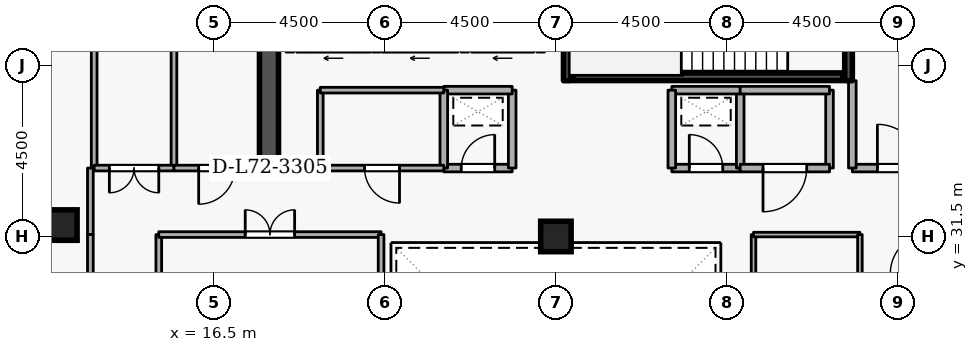
"""IFC4 building model, lengths in metres.
Left out: names, types, materials, properties, quantities, classifications, styles, units other than length and angle.
Written with IfcOpenShell. Run it as: python <this file> out.ifc"""

import sys

from ifc_helpers import new_model, si_unit, direction, frame, frame_2d, origin, origin_2d, place, context, subcontext, project, spatial, rectangle, extrude, element, fill, save


model = new_model("IFC4")
c1 = context("Model", 3, precision=1e-05, world=origin(), true_north=direction((0.0, 1.0)))
c2 = subcontext(c1, "Body", "Model", "MODEL_VIEW")
j1 = project(units=[si_unit("LENGTHUNIT", "METRE"), si_unit("PLANEANGLEUNIT", "RADIAN")], contexts=[c1])
p1 = place(None, origin())
s1 = spatial("IfcSite", under=j1, at=p1, CompositionType="ELEMENT")
p2 = place(p1, origin())
s2 = spatial("IfcBuilding", under=s1, at=p2, CompositionType="ELEMENT")
p3 = place(p2, frame((0.0, 0.0, 269.1)))
s3 = spatial("IfcBuildingStorey", under=s2, at=p3, CompositionType="ELEMENT", Elevation=269.1)
p4 = place(p3, frame((17.95, 33.1, 0.0), z_axis=(0.0, 0.0, 1.0), x_axis=(0.0, 1.0, 0.0)))
e1 = element("IfcWall", 1, at=p4, inside=s3, PredefinedType="SHEAR", context=c2, shape_type="SweptSolid", body=[
    extrude(rectangle(XDim=5.8, YDim=0.5, at=frame_2d((2.9, 0.0))), origin(), (0.0, 0.0, 1.0), 3.6),
])
for number, where, z_axis, x_axis in (
    (2, (12.5, 31.8, 0.0), (0.0, 0.0, 1.0), (1.0, 0.0, 0.0)),
    (3, (25.5, 31.5, 0.0), (0.0, 0.0, 1.0), (1.0, 0.0, 0.0)),
):
    element("IfcColumn", number, at=place(p3, frame(where, z_axis=z_axis, x_axis=x_axis)), inside=s3, PredefinedType="COLUMN", context=c2, shape_type="SweptSolid", body=[
        extrude(rectangle(XDim=0.8, YDim=0.8, at=origin_2d()), origin(), (0.0, 0.0, 1.0), 3.6),
    ])
p5 = place(p3, frame((24.92, 36.45, 0.0), z_axis=(0.0, 0.0, 1.0), x_axis=(-1.0, 0.0, 0.0)))
e4 = element("IfcWall", 4, at=p5, inside=s3, PredefinedType="STANDARD", context=c2, shape_type="SweptSolid", body=[
    extrude(rectangle(XDim=1.64, YDim=0.2, at=frame_2d((0.82, 0.0))), origin(), (0.0, 0.0, 1.0), 3.34),
])
p6 = place(p5, frame((0.31, 0.0, 0.0)))
e5 = element("IfcOpeningElement", 5, at=p6, cuts=e4, PredefinedType="OPENING", context=c2, shape_type="SweptSolid", body=[
    extrude(rectangle(XDim=1.02, YDim=2.06, at=frame_2d((0.51, 1.03))), frame((0.0, 0.11, 0.0), z_axis=(0.0, -1.0, 0.0), x_axis=(1.0, 0.0, 0.0)), (0.0, 0.0, 1.0), 0.22),
])
p7 = place(p3, frame((22.92, 36.45, 0.0), z_axis=(0.0, 0.0, 1.0), x_axis=(-1.0, 0.0, 0.0)))
e6 = element("IfcWall", 6, at=p7, inside=s3, PredefinedType="STANDARD", context=c2, shape_type="SweptSolid", body=[
    extrude(rectangle(XDim=1.99, YDim=0.2, at=frame_2d((0.995, 0.0))), origin(), (0.0, 0.0, 1.0), 3.34),
])
p8 = place(p7, frame((0.485, 0.0, 0.0)))
e7 = element("IfcOpeningElement", 7, at=p8, cuts=e6, PredefinedType="OPENING", context=c2, shape_type="SweptSolid", body=[
    extrude(rectangle(XDim=1.02, YDim=2.06, at=frame_2d((0.51, 1.03))), frame((0.0, 0.11, 0.0), z_axis=(0.0, -1.0, 0.0), x_axis=(1.0, 0.0, 0.0)), (0.0, 0.0, 1.0), 0.22),
])
p9 = place(p3, frame((20.62, 36.45, 0.0), z_axis=(0.0, 0.0, 1.0), x_axis=(-1.0, 0.0, 0.0)))
e8 = element("IfcWall", 8, at=p9, inside=s3, PredefinedType="STANDARD", context=c2, shape_type="SweptSolid", body=[
    extrude(rectangle(XDim=1.94, YDim=0.2, at=frame_2d((0.97, 0.0))), origin(), (0.0, 0.0, 1.0), 3.34),
])
p10 = place(p9, frame((0.46, 0.0, 0.0)))
e9 = element("IfcOpeningElement", 9, at=p10, cuts=e8, PredefinedType="OPENING", context=c2, shape_type="SweptSolid", body=[
    extrude(rectangle(XDim=1.02, YDim=2.06, at=frame_2d((0.51, 1.03))), frame((0.0, 0.11, 0.0), z_axis=(0.0, -1.0, 0.0), x_axis=(1.0, 0.0, 0.0)), (0.0, 0.0, 1.0), 0.22),
])
p11 = place(p3, frame((33.2, 38.95, 0.0), z_axis=(0.0, 0.0, 1.0), x_axis=(0.0, -1.0, 0.0)))
e10 = element("IfcWall", 10, at=p11, inside=s3, PredefinedType="SHEAR", context=c2, shape_type="SweptSolid", body=[
    extrude(rectangle(XDim=3.35, YDim=0.2, at=frame_2d((1.675, 0.0))), origin(), (0.0, 0.0, 1.0), 3.6),
])
p12 = place(p11, frame((1.125, 0.0, 0.0)))
e11 = element("IfcOpeningElement", 11, at=p12, cuts=e10, PredefinedType="OPENING", context=c2, shape_type="SweptSolid", body=[
    extrude(rectangle(XDim=1.1, YDim=2.1, at=frame_2d((0.55, 1.05))), frame((0.0, 0.11, 0.0), z_axis=(0.0, -1.0, 0.0), x_axis=(1.0, 0.0, 0.0)), (0.0, 0.0, 1.0), 0.22),
])
p13 = place(p3, frame((25.8, 35.6, 0.0), z_axis=(0.0, 0.0, 1.0), x_axis=(0.0, 1.0, 0.0)))
e12 = element("IfcWall", 12, at=p13, inside=s3, PredefinedType="SHEAR", context=c2, shape_type="SweptSolid", body=[
    extrude(rectangle(XDim=3.35, YDim=0.2, at=frame_2d((1.675, 0.0))), origin(), (0.0, 0.0, 1.0), 3.6),
])
p14 = place(p3, frame((25.95, 35.703, 0.0), z_axis=(0.0, 0.0, 1.0), x_axis=(1.0, 0.0, 0.0)))
e13 = element("IfcWall", 13, at=p14, inside=s3, PredefinedType="SHEAR", context=c2, shape_type="SweptSolid", body=[
    extrude(rectangle(XDim=7.1, YDim=0.2, at=frame_2d((3.55, 0.0))), origin(), (0.0, 0.0, 1.0), 3.6),
])
p15 = place(p3, frame((33.3, 33.3, 0.0), z_axis=(0.0, 0.0, 1.0), x_axis=(1.0, 0.0, 0.0)))
e14 = element("IfcWall", 14, at=p15, inside=s3, PredefinedType="STANDARD", context=c2, shape_type="SweptSolid", body=[
    extrude(rectangle(XDim=2.5, YDim=0.2, at=frame_2d((1.25, 0.0))), origin(), (0.0, 0.0, 1.0), 3.34),
])
p16 = place(p15, frame((0.66, 0.0, 0.0)))
e15 = element("IfcOpeningElement", 15, at=p16, cuts=e14, PredefinedType="OPENING", context=c2, shape_type="SweptSolid", body=[
    extrude(rectangle(XDim=1.15, YDim=2.1, at=frame_2d((0.575, 1.05))), frame((0.0, 0.11, 0.0), z_axis=(0.0, -1.0, 0.0), x_axis=(1.0, 0.0, 0.0)), (0.0, 0.0, 1.0), 0.22),
])
p17 = place(p3, frame((33.3, 35.6, 0.0), z_axis=(0.0, 0.0, 1.0), x_axis=(0.0, -1.0, 0.0)))
e16 = element("IfcWall", 16, at=p17, inside=s3, PredefinedType="STANDARD", context=c2, shape_type="SweptSolid", body=[
    extrude(rectangle(XDim=2.3, YDim=0.2, at=frame_2d((1.15, 0.0))), origin(), (0.0, 0.0, 1.0), 2.545),
])
p18 = place(p3, frame((22.55, 33.3, 0.0), z_axis=(0.0, 0.0, 1.0), x_axis=(1.0, 0.0, 0.0)))
e17 = element("IfcWall", 17, at=p18, inside=s3, PredefinedType="STANDARD", context=c2, shape_type="SweptSolid", body=[
    extrude(rectangle(XDim=1.8, YDim=0.2, at=frame_2d((0.9, 0.0))), origin(), (0.0, 0.0, 1.0), 3.34),
])
p19 = place(p18, frame((0.46, 0.0, 0.0)))
e18 = element("IfcOpeningElement", 18, at=p19, cuts=e17, PredefinedType="OPENING", context=c2, shape_type="SweptSolid", body=[
    extrude(rectangle(XDim=0.88, YDim=2.04, at=frame_2d((0.44, 1.02))), frame((0.0, 0.11, 0.0), z_axis=(0.0, -1.0, 0.0), x_axis=(1.0, 0.0, 0.0)), (0.0, 0.0, 1.0), 0.22),
])
p20 = place(p3, frame((24.35, 33.3, 0.0), z_axis=(0.0, 0.0, 1.0), x_axis=(0.0, 1.0, 0.0)))
e19 = element("IfcWall", 19, at=p20, inside=s3, PredefinedType="STANDARD", context=c2, shape_type="SweptSolid", body=[
    extrude(rectangle(XDim=2.05, YDim=0.2, at=frame_2d((1.025, 0.0))), origin(), (0.0, 0.0, 1.0), 3.34),
])
p21 = place(p3, frame((24.35, 35.35, 0.0), z_axis=(0.0, 0.0, 1.0), x_axis=(-1.0, 0.0, 0.0)))
e20 = element("IfcWall", 20, at=p21, inside=s3, PredefinedType="STANDARD", context=c2, shape_type="SweptSolid", body=[
    extrude(rectangle(XDim=1.8, YDim=0.2, at=frame_2d((0.9, 0.0))), origin(), (0.0, 0.0, 1.0), 3.34),
])
p22 = place(p3, frame((22.55, 35.35, 0.0), z_axis=(0.0, 0.0, 1.0), x_axis=(0.0, -1.0, 0.0)))
e21 = element("IfcWall", 21, at=p22, inside=s3, PredefinedType="STANDARD", context=c2, shape_type="SweptSolid", body=[
    extrude(rectangle(XDim=2.05, YDim=0.2, at=frame_2d((1.025, 0.0))), origin(), (0.0, 0.0, 1.0), 3.34),
])
p23 = place(p3, frame((28.55, 33.3, 0.0), z_axis=(0.0, 0.0, 1.0), x_axis=(1.0, 0.0, 0.0)))
e22 = element("IfcWall", 22, at=p23, inside=s3, PredefinedType="STANDARD", context=c2, shape_type="SweptSolid", body=[
    extrude(rectangle(XDim=1.8, YDim=0.2, at=frame_2d((0.9, 0.0))), origin(), (0.0, 0.0, 1.0), 3.34),
])
p24 = place(p23, frame((0.46, 0.0, 0.0)))
e23 = element("IfcOpeningElement", 23, at=p24, cuts=e22, PredefinedType="OPENING", context=c2, shape_type="SweptSolid", body=[
    extrude(rectangle(XDim=0.88, YDim=2.04, at=frame_2d((0.44, 1.02))), frame((0.0, 0.11, 0.0), z_axis=(0.0, -1.0, 0.0), x_axis=(1.0, 0.0, 0.0)), (0.0, 0.0, 1.0), 0.22),
])
p25 = place(p3, frame((30.35, 33.3, 0.0), z_axis=(0.0, 0.0, 1.0), x_axis=(0.0, 1.0, 0.0)))
e24 = element("IfcWall", 24, at=p25, inside=s3, PredefinedType="STANDARD", context=c2, shape_type="SweptSolid", body=[
    extrude(rectangle(XDim=2.05, YDim=0.2, at=frame_2d((1.025, 0.0))), origin(), (0.0, 0.0, 1.0), 3.34),
])
p26 = place(p3, frame((30.35, 35.35, 0.0), z_axis=(0.0, 0.0, 1.0), x_axis=(-1.0, 0.0, 0.0)))
e25 = element("IfcWall", 25, at=p26, inside=s3, PredefinedType="STANDARD", context=c2, shape_type="SweptSolid", body=[
    extrude(rectangle(XDim=1.8, YDim=0.2, at=frame_2d((0.9, 0.0))), origin(), (0.0, 0.0, 1.0), 3.34),
])
p27 = place(p3, frame((28.55, 35.35, 0.0), z_axis=(0.0, 0.0, 1.0), x_axis=(0.0, -1.0, 0.0)))
e26 = element("IfcWall", 26, at=p27, inside=s3, PredefinedType="STANDARD", context=c2, shape_type="SweptSolid", body=[
    extrude(rectangle(XDim=2.05, YDim=0.2, at=frame_2d((1.025, 0.0))), origin(), (0.0, 0.0, 1.0), 3.34),
])
p28 = place(p3, frame((32.7, 35.35, 0.0), z_axis=(0.0, 0.0, 1.0), x_axis=(0.0, -1.0, 0.0)))
e27 = element("IfcWall", 27, at=p28, inside=s3, PredefinedType="STANDARD", context=c2, shape_type="SweptSolid", body=[
    extrude(rectangle(XDim=2.05, YDim=0.2, at=frame_2d((1.025, 0.0))), origin(), (0.0, 0.0, 1.0), 2.545),
])
p29 = place(p3, frame((32.7, 33.3, 0.0), z_axis=(0.0, 0.0, 1.0), x_axis=(-1.0, 0.0, 0.0)))
e28 = element("IfcWall", 28, at=p29, inside=s3, PredefinedType="STANDARD", context=c2, shape_type="SweptSolid", body=[
    extrude(rectangle(XDim=2.35, YDim=0.2, at=frame_2d((1.175, 0.0))), origin(), (0.0, 0.0, 1.0), 3.34),
])
p30 = place(p29, frame((0.6, 0.0, 0.0)))
e29 = element("IfcOpeningElement", 29, at=p30, cuts=e28, PredefinedType="OPENING", context=c2, shape_type="SweptSolid", body=[
    extrude(rectangle(XDim=1.15, YDim=2.1, at=frame_2d((0.575, 1.05))), frame((0.0, 0.11, 0.0), z_axis=(0.0, -1.0, 0.0), x_axis=(1.0, 0.0, 0.0)), (0.0, 0.0, 1.0), 0.22),
])
p31 = place(p3, frame((30.35, 35.35, 0.0), z_axis=(0.0, 0.0, 1.0), x_axis=(1.0, 0.0, 0.0)))
e30 = element("IfcWall", 30, at=p31, inside=s3, PredefinedType="STANDARD", context=c2, shape_type="SweptSolid", body=[
    extrude(rectangle(XDim=2.35, YDim=0.2, at=frame_2d((1.175, 0.0))), origin(), (0.0, 0.0, 1.0), 3.34),
])
p32 = place(p3, frame((19.3, 33.3, 0.0), z_axis=(0.0, 0.0, 1.0), x_axis=(0.0, 1.0, 0.0)))
e31 = element("IfcWall", 31, at=p32, inside=s3, PredefinedType="PARTITIONING", context=c2, shape_type="SweptSolid", body=[
    extrude(rectangle(XDim=2.05, YDim=0.15, at=frame_2d((1.025, 0.0))), origin(), (0.0, 0.0, 1.0), 3.34),
])
p33 = place(p3, frame((19.3, 35.35, 0.0), z_axis=(0.0, 0.0, 1.0), x_axis=(1.0, 0.0, 0.0)))
e32 = element("IfcWall", 32, at=p33, inside=s3, PredefinedType="PARTITIONING", context=c2, shape_type="SweptSolid", body=[
    extrude(rectangle(XDim=3.25, YDim=0.15, at=frame_2d((1.625, 0.0))), origin(), (0.0, 0.0, 1.0), 3.34),
])
p34 = place(p3, frame((22.55, 33.3, 0.0), z_axis=(0.0, 0.0, 1.0), x_axis=(-1.0, 0.0, 0.0)))
e33 = element("IfcWall", 33, at=p34, inside=s3, PredefinedType="PARTITIONING", context=c2, shape_type="SweptSolid", body=[
    extrude(rectangle(XDim=3.25, YDim=0.15, at=frame_2d((1.625, 0.0))), origin(), (0.0, 0.0, 1.0), 3.34),
])
p35 = place(p34, frame((1.165, 0.0, 0.0)))
e34 = element("IfcOpeningElement", 34, at=p35, cuts=e33, PredefinedType="OPENING", context=c2, shape_type="SweptSolid", body=[
    extrude(rectangle(XDim=0.92, YDim=2.08, at=frame_2d((0.46, 1.04))), frame((0.0, 0.085, 0.0), z_axis=(0.0, -1.0, 0.0), x_axis=(1.0, 0.0, 0.0)), (0.0, 0.0, 1.0), 0.17),
])
for number, where, z_axis, x_axis in (
    (35, (13.35, 33.3, 0.0), (0.0, 0.0, 1.0), (0.0, 1.0, 0.0)),
    (36, (15.45, 44.72, 0.0), (0.0, 0.0, 1.0), (0.0, -1.0, 0.0)),
):
    element("IfcWall", number, at=place(p3, frame(where, z_axis=z_axis, x_axis=x_axis)), inside=s3, PredefinedType="PARTITIONING", context=c2, shape_type="SweptSolid", body=[
        extrude(rectangle(XDim=11.42, YDim=0.15, at=frame_2d((5.71, 0.0))), origin(), (0.0, 0.0, 1.0), 3.34),
    ])
p36 = place(p3, frame((15.45, 33.3, 0.0), z_axis=(0.0, 0.0, 1.0), x_axis=(-1.0, 0.0, 0.0)))
e37 = element("IfcWall", 37, at=p36, inside=s3, PredefinedType="PARTITIONING", context=c2, shape_type="SweptSolid", body=[
    extrude(rectangle(XDim=2.1, YDim=0.15, at=frame_2d((1.05, 0.0))), origin(), (0.0, 0.0, 1.0), 3.34),
])
p37 = place(p36, frame((0.4, 0.0, 0.0)))
e38 = element("IfcOpeningElement", 38, at=p37, cuts=e37, PredefinedType="OPENING", context=c2, shape_type="SweptSolid", body=[
    extrude(rectangle(XDim=1.3, YDim=2.12, at=frame_2d((0.65, 1.06))), frame((0.0, 0.085, 0.0), z_axis=(0.0, -1.0, 0.0), x_axis=(1.0, 0.0, 0.0)), (0.0, 0.0, 1.0), 0.17),
])
p38 = place(p3, frame((17.7, 33.3, 0.0), z_axis=(0.0, 0.0, 1.0), x_axis=(-1.0, 0.0, 0.0)))
e39 = element("IfcWall", 39, at=p38, inside=s3, PredefinedType="PARTITIONING", context=c2, shape_type="SweptSolid", body=[
    extrude(rectangle(XDim=2.25, YDim=0.15, at=frame_2d((1.125, 0.0))), origin(), (0.0, 0.0, 1.0), 3.34),
])
p39 = place(p38, frame((0.65, 0.0, 0.0)))
e40 = element("IfcOpeningElement", 40, at=p39, cuts=e39, PredefinedType="OPENING", context=c2, shape_type="SweptSolid", body=[
    extrude(rectangle(XDim=0.95, YDim=2.1, at=frame_2d((0.475, 1.05))), frame((0.0, 0.085, 0.0), z_axis=(0.0, -1.0, 0.0), x_axis=(1.0, 0.0, 0.0)), (0.0, 0.0, 1.0), 0.17),
])
p40 = place(p3, frame((13.25, 33.3, 0.0), z_axis=(0.0, 0.0, 1.0), x_axis=(0.0, -1.0, 0.0)))
e41 = element("IfcWall", 41, at=p40, inside=s3, PredefinedType="PARTITIONING", context=c2, shape_type="SweptSolid", body=[
    extrude(rectangle(XDim=1.75, YDim=0.15, at=frame_2d((0.875, 0.0))), origin(), (0.0, 0.0, 1.0), 3.34),
])
p41 = place(p3, frame((13.25, 31.55, 0.0), z_axis=(0.0, 0.0, 1.0), x_axis=(0.0, -1.0, 0.0)))
e42 = element("IfcWall", 42, at=p41, inside=s3, PredefinedType="PARTITIONING", context=c2, shape_type="SweptSolid", body=[
    extrude(rectangle(XDim=3.35, YDim=0.15, at=frame_2d((1.675, 0.0))), origin(), (0.0, 0.0, 1.0), 3.34),
])
p42 = place(p41, frame((1.025, 0.0, 0.0)))
e43 = element("IfcOpeningElement", 43, at=p42, cuts=e42, PredefinedType="OPENING", context=c2, shape_type="SweptSolid", body=[
    extrude(rectangle(XDim=1.3, YDim=2.12, at=frame_2d((0.65, 1.06))), frame((0.0, 0.085, 0.0), z_axis=(0.0, -1.0, 0.0), x_axis=(1.0, 0.0, 0.0)), (0.0, 0.0, 1.0), 0.17),
])
p43 = place(p3, frame((15.05, 28.2, 0.0), z_axis=(0.0, 0.0, 1.0), x_axis=(0.0, 1.0, 0.0)))
e44 = element("IfcWall", 44, at=p43, inside=s3, PredefinedType="PARTITIONING", context=c2, shape_type="SweptSolid", body=[
    extrude(rectangle(XDim=3.35, YDim=0.15, at=frame_2d((1.675, 0.0))), origin(), (0.0, 0.0, 1.0), 3.34),
])
p44 = place(p3, frame((15.05, 31.55, 0.0), z_axis=(0.0, 0.0, 1.0), x_axis=(1.0, 0.0, 0.0)))
e45 = element("IfcWall", 45, at=p44, inside=s3, PredefinedType="PARTITIONING", context=c2, shape_type="SweptSolid", body=[
    extrude(rectangle(XDim=5.85, YDim=0.15, at=frame_2d((2.925, 0.0))), origin(), (0.0, 0.0, 1.0), 3.34),
])
p45 = place(p44, frame((2.275, 0.0, 0.0)))
e46 = element("IfcOpeningElement", 46, at=p45, cuts=e45, PredefinedType="OPENING", context=c2, shape_type="SweptSolid", body=[
    extrude(rectangle(XDim=1.3, YDim=2.12, at=frame_2d((0.65, 1.06))), frame((0.0, 0.085, 0.0), z_axis=(0.0, -1.0, 0.0), x_axis=(1.0, 0.0, 0.0)), (0.0, 0.0, 1.0), 0.17),
])
p46 = place(p3, frame((20.9, 31.55, 0.0), z_axis=(0.0, 0.0, 1.0), x_axis=(0.0, -1.0, 0.0)))
e47 = element("IfcWall", 47, at=p46, inside=s3, PredefinedType="PARTITIONING", context=c2, shape_type="SweptSolid", body=[
    extrude(rectangle(XDim=3.35, YDim=0.15, at=frame_2d((1.675, 0.0))), origin(), (0.0, 0.0, 1.0), 3.34),
])
p47 = place(p3, frame((30.7, 27.0, 0.0), z_axis=(0.0, 0.0, 1.0), x_axis=(0.0, 1.0, 0.0)))
e48 = element("IfcWall", 48, at=p47, inside=s3, PredefinedType="PARTITIONING", context=c2, shape_type="SweptSolid", body=[
    extrude(rectangle(XDim=4.55, YDim=0.12, at=frame_2d((2.275, 0.0))), origin(), (0.0, 0.0, 1.0), 3.34),
])
p48 = place(p3, frame((30.7, 31.55, 0.0), z_axis=(0.0, 0.0, 1.0), x_axis=(1.0, 0.0, 0.0)))
e49 = element("IfcWall", 49, at=p48, inside=s3, PredefinedType="PARTITIONING", context=c2, shape_type="SweptSolid", body=[
    extrude(rectangle(XDim=2.8, YDim=0.12, at=frame_2d((1.4, 0.0))), origin(), (0.0, 0.0, 1.0), 3.34),
])
p49 = place(p3, frame((33.5, 31.55, 0.0), z_axis=(0.0, 0.0, 1.0), x_axis=(0.0, -1.0, 0.0)))
e50 = element("IfcWall", 50, at=p49, inside=s3, PredefinedType="PARTITIONING", context=c2, shape_type="SweptSolid", body=[
    extrude(rectangle(XDim=4.55, YDim=0.12, at=frame_2d((2.275, 0.0))), origin(), (0.0, 0.0, 1.0), 3.34),
])
p50 = place(p49, frame((1.8, 0.0, 0.0)))
e51 = element("IfcOpeningElement", 51, at=p50, cuts=e50, PredefinedType="OPENING", context=c2, shape_type="SweptSolid", body=[
    extrude(rectangle(XDim=0.95, YDim=2.1, at=frame_2d((0.475, 1.05))), frame((0.0, 0.07, 0.0), z_axis=(0.0, -1.0, 0.0), x_axis=(1.0, 0.0, 0.0)), (0.0, 0.0, 1.0), 0.14),
])
p51 = place(p16, origin())
e52 = element("IfcDoor", 52, at=p51, inside=s3, OperationType="SINGLE_SWING_LEFT", PredefinedType="DOOR", context=c2, shape_type="SweptSolid", body=[
    extrude(rectangle(XDim=1.15, YDim=2.1, at=frame_2d((0.575, 1.05))), frame((0.0, 0.025, 0.0), z_axis=(0.0, -1.0, 0.0), x_axis=(1.0, 0.0, 0.0)), (0.0, 0.0, 1.0), 0.05),
])
fill(e15, e52)
p52 = place(p19, origin())
e53 = element("IfcDoor", 53, at=p52, inside=s3, OperationType="SINGLE_SWING_RIGHT", PredefinedType="DOOR", context=c2, shape_type="SweptSolid", body=[
    extrude(rectangle(XDim=0.88, YDim=2.04, at=frame_2d((0.44, 1.02))), frame((0.0, 0.025, 0.0), z_axis=(0.0, -1.0, 0.0), x_axis=(1.0, 0.0, 0.0)), (0.0, 0.0, 1.0), 0.05),
])
fill(e18, e53)
p53 = place(p24, origin())
e54 = element("IfcDoor", 54, at=p53, inside=s3, OperationType="SINGLE_SWING_LEFT", PredefinedType="DOOR", context=c2, shape_type="SweptSolid", body=[
    extrude(rectangle(XDim=0.88, YDim=2.04, at=frame_2d((0.44, 1.02))), frame((0.0, 0.025, 0.0), z_axis=(0.0, -1.0, 0.0), x_axis=(1.0, 0.0, 0.0)), (0.0, 0.0, 1.0), 0.05),
])
fill(e23, e54)
p54 = place(p35, origin())
e55 = element("IfcDoor", 55, at=p54, inside=s3, OperationType="SINGLE_SWING_LEFT", PredefinedType="DOOR", context=c2, shape_type="SweptSolid", body=[
    extrude(rectangle(XDim=0.92, YDim=2.08, at=frame_2d((0.46, 1.04))), frame((0.0, 0.025, 0.0), z_axis=(0.0, -1.0, 0.0), x_axis=(1.0, 0.0, 0.0)), (0.0, 0.0, 1.0), 0.05),
])
fill(e34, e55)
p55 = place(p30, origin())
e56 = element("IfcDoor", 56, at=p55, inside=s3, OperationType="SINGLE_SWING_RIGHT", PredefinedType="DOOR", context=c2, shape_type="SweptSolid", body=[
    extrude(rectangle(XDim=1.15, YDim=2.1, at=frame_2d((0.575, 1.05))), frame((0.0, 0.025, 0.0), z_axis=(0.0, -1.0, 0.0), x_axis=(1.0, 0.0, 0.0)), (0.0, 0.0, 1.0), 0.05),
])
fill(e29, e56)
p56 = place(p37, origin())
e57 = element("IfcDoor", 57, at=p56, inside=s3, OperationType="DOUBLE_DOOR_SINGLE_SWING", PredefinedType="DOOR", context=c2, shape_type="SweptSolid", body=[
    extrude(rectangle(XDim=1.3, YDim=2.12, at=frame_2d((0.65, 1.06))), frame((0.0, 0.025, 0.0), z_axis=(0.0, -1.0, 0.0), x_axis=(1.0, 0.0, 0.0)), (0.0, 0.0, 1.0), 0.05),
])
fill(e38, e57)
p57 = place(p39, origin())
e58 = element("IfcDoor", 58, at=p57, inside=s3, OperationType="SINGLE_SWING_RIGHT", PredefinedType="DOOR", context=c2, shape_type="SweptSolid", body=[
    extrude(rectangle(XDim=0.95, YDim=2.1, at=frame_2d((0.475, 1.05))), frame((0.0, 0.025, 0.0), z_axis=(0.0, -1.0, 0.0), x_axis=(1.0, 0.0, 0.0)), (0.0, 0.0, 1.0), 0.05),
])
fill(e40, e58)
p58 = place(p45, origin())
e59 = element("IfcDoor", 59, at=p58, inside=s3, OperationType="DOUBLE_DOOR_SINGLE_SWING", PredefinedType="DOOR", context=c2, shape_type="SweptSolid", body=[
    extrude(rectangle(XDim=1.3, YDim=2.12, at=frame_2d((0.65, 1.06))), frame((0.0, 0.025, 0.0), z_axis=(0.0, -1.0, 0.0), x_axis=(1.0, 0.0, 0.0)), (0.0, 0.0, 1.0), 0.05),
])
fill(e46, e59)
save(model, sys.argv[1])
